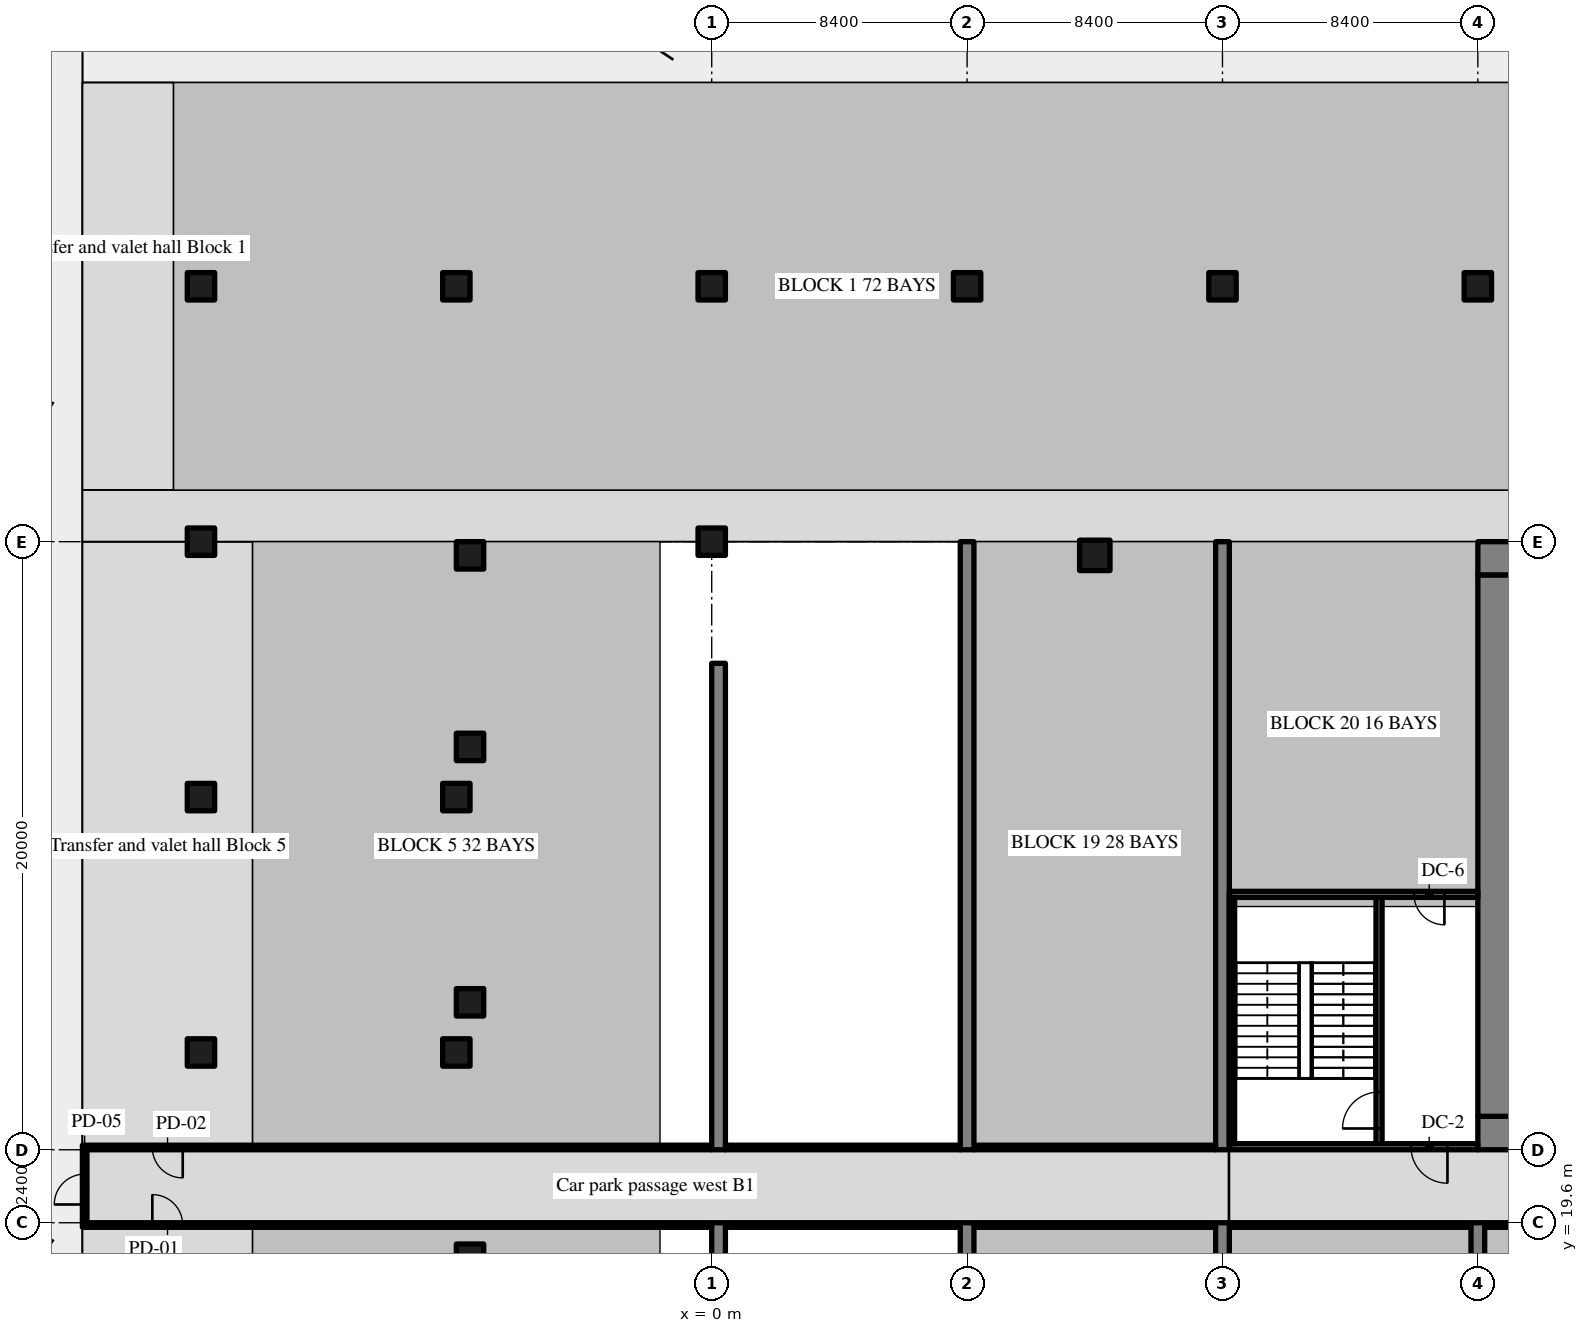
"""IFC4 building model, lengths in metres.
Left out: names, types, materials, properties, quantities, classifications, styles, units other than length and angle.
Written with IfcOpenShell. Run it as: python <this file> out.ifc"""

import sys

from ifc_helpers import new_model, si_unit, direction, frame, frame_2d, origin, origin_2d, place, context, subcontext, project, spatial, rectangle, extrude, source, transform, mapped, element, fill, save


model = new_model("IFC4")
c1 = context("Model", 3, precision=1e-05, world=origin(), true_north=direction((0.0, 1.0)))
c2 = subcontext(c1, "Body", "Model", "MODEL_VIEW")
j1 = project(units=[si_unit("LENGTHUNIT", "METRE"), si_unit("PLANEANGLEUNIT", "RADIAN")], contexts=[c1])
p1 = place(None, origin())
s1 = spatial("IfcSite", under=j1, at=p1, CompositionType="ELEMENT")
p2 = place(p1, origin())
s2 = spatial("IfcBuilding", under=s1, at=p2, CompositionType="ELEMENT")
p3 = place(p2, frame((0.0, 0.0, -4.5)))
s3 = spatial("IfcBuildingStorey", under=s2, at=p3, CompositionType="ELEMENT", Elevation=-4.5)
m1 = source(origin(), c2, "Body", "SweptSolid", [
    extrude(rectangle(XDim=50.4, YDim=1.1, at=frame_2d((25.2, 0.0))), origin(), (0.0, 0.0, 1.0), 4.22),
])
p4 = place(p3, frame((25.2, 22.55, 0.0), z_axis=(0.0, 0.0, 1.0), x_axis=(1.0, 0.0, 0.0)))
e1 = element("IfcWall", 1, at=p4, inside=s3, PredefinedType="SHEAR", context=c2, shape_type="MappedRepresentation", body=[
    mapped(m1, transform((0.0, 0.0, 0.0), scale=1.0)),
])
m2 = source(origin(), c2, "Body", "SweptSolid", [
    extrude(rectangle(XDim=1.8, YDim=2.1, at=frame_2d((0.9, 1.05))), frame((0.0, 0.56, 0.0), z_axis=(0.0, -1.0, 0.0), x_axis=(1.0, 0.0, 0.0)), (0.0, 0.0, 1.0), 1.12),
])
p5 = place(p4, frame((15.9, 0.0, 0.0)))
e2 = element("IfcOpeningElement", 2, at=p5, cuts=e1, PredefinedType="OPENING", context=c2, shape_type="MappedRepresentation", body=[
    mapped(m2, transform((0.0, 0.0, 0.0), scale=1.0)),
])
m3 = source(origin(), c2, "Body", "SweptSolid", [
    extrude(rectangle(XDim=1.2, YDim=2.1, at=frame_2d((0.6, 1.05))), frame((0.0, 0.56, 0.0), z_axis=(0.0, -1.0, 0.0), x_axis=(1.0, 0.0, 0.0)), (0.0, 0.0, 1.0), 1.12),
])
p6 = place(p4, frame((27.0, 0.0, 0.0)))
e3 = element("IfcOpeningElement", 3, at=p6, cuts=e1, PredefinedType="OPENING", context=c2, shape_type="MappedRepresentation", body=[
    mapped(m3, transform((0.0, 0.0, 0.0), scale=1.0)),
])
m4 = source(origin(), c2, "Body", "SweptSolid", [
    extrude(rectangle(XDim=0.9, YDim=2.1, at=frame_2d((0.45, 1.05))), frame((0.0, 0.56, 0.0), z_axis=(0.0, -1.0, 0.0), x_axis=(1.0, 0.0, 0.0)), (0.0, 0.0, 1.0), 1.12),
])
p7 = place(p4, frame((34.5, 0.0, 0.0)))
e4 = element("IfcOpeningElement", 4, at=p7, cuts=e1, PredefinedType="OPENING", context=c2, shape_type="MappedRepresentation", body=[
    mapped(m4, transform((0.0, 0.0, 0.0), scale=1.0)),
])
p8 = place(p4, frame((31.5, 0.0, 0.0)))
e5 = element("IfcOpeningElement", 5, at=p8, cuts=e1, PredefinedType="OPENING", context=c2, shape_type="MappedRepresentation", body=[
    mapped(m4, transform((0.0, 0.0, 0.0), scale=1.0)),
])
p9 = place(p4, frame((39.75, 0.0, 0.0)))
e6 = element("IfcOpeningElement", 6, at=p9, cuts=e1, PredefinedType="OPENING", context=c2, shape_type="MappedRepresentation", body=[
    mapped(m4, transform((0.0, 0.0, 0.0), scale=1.0)),
])
p10 = place(p4, frame((36.75, 0.0, 0.0)))
e7 = element("IfcOpeningElement", 7, at=p10, cuts=e1, PredefinedType="OPENING", context=c2, shape_type="MappedRepresentation", body=[
    mapped(m4, transform((0.0, 0.0, 0.0), scale=1.0)),
])
p11 = place(p4, frame((6.425, 0.0, 0.0)))
e8 = element("IfcOpeningElement", 8, at=p11, cuts=e1, PredefinedType="OPENING", context=c2, shape_type="MappedRepresentation", body=[
    mapped(m3, transform((0.0, 0.0, 0.0), scale=1.0)),
])
p12 = place(p4, frame((47.675, 0.0, 0.0)))
e9 = element("IfcOpeningElement", 9, at=p12, cuts=e1, PredefinedType="OPENING", context=c2, shape_type="MappedRepresentation", body=[
    mapped(m3, transform((0.0, 0.0, 0.0), scale=1.0)),
])
p13 = place(p3, frame((25.2, 41.45, 0.0), z_axis=(0.0, 0.0, 1.0), x_axis=(1.0, 0.0, 0.0)))
e10 = element("IfcWall", 10, at=p13, inside=s3, PredefinedType="SHEAR", context=c2, shape_type="MappedRepresentation", body=[
    mapped(m1, transform((0.0, 0.0, 0.0), scale=1.0)),
])
m5 = source(origin(), c2, "Body", "SweptSolid", [
    extrude(rectangle(XDim=17.8, YDim=1.1, at=frame_2d((8.9, 0.0))), origin(), (0.0, 0.0, 1.0), 4.22),
])
p14 = place(p3, frame((25.75, 23.1, 0.0), z_axis=(0.0, 0.0, 1.0), x_axis=(0.0, 1.0, 0.0)))
e11 = element("IfcWall", 11, at=p14, inside=s3, PredefinedType="SHEAR", context=c2, shape_type="MappedRepresentation", body=[
    mapped(m5, transform((0.0, 0.0, 0.0), scale=1.0)),
])
m6 = source(origin(), c2, "Body", "SweptSolid", [
    extrude(rectangle(XDim=15.6, YDim=0.45, at=frame_2d((7.8, 0.0))), origin(), (0.0, 0.0, 1.0), 4.22),
])
p15 = place(p3, frame((0.225, 4.0, 0.0), z_axis=(0.0, 0.0, 1.0), x_axis=(0.0, 1.0, 0.0)))
e12 = element("IfcWall", 12, at=p15, inside=s3, PredefinedType="SHEAR", context=c2, shape_type="MappedRepresentation", body=[
    mapped(m6, transform((0.0, 0.0, 0.0), scale=1.0)),
])
m7 = source(origin(), c2, "Body", "SweptSolid", [
    extrude(rectangle(XDim=16.0, YDim=0.45, at=frame_2d((8.0, 0.0))), origin(), (0.0, 0.0, 1.0), 4.22),
])
p16 = place(p3, frame((0.225, 22.0, 0.0), z_axis=(0.0, 0.0, 1.0), x_axis=(0.0, 1.0, 0.0)))
e13 = element("IfcWall", 13, at=p16, inside=s3, PredefinedType="SHEAR", context=c2, shape_type="MappedRepresentation", body=[
    mapped(m7, transform((0.0, 0.0, 0.0), scale=1.0)),
])
m8 = source(origin(), c2, "Body", "SweptSolid", [
    extrude(rectangle(XDim=19.6, YDim=0.45, at=frame_2d((9.8, 0.0))), origin(), (0.0, 0.0, 1.0), 4.22),
])
p17 = place(p3, frame((8.4, 0.0, 0.0), z_axis=(0.0, 0.0, 1.0), x_axis=(0.0, 1.0, 0.0)))
e14 = element("IfcWall", 14, at=p17, inside=s3, PredefinedType="SHEAR", context=c2, shape_type="MappedRepresentation", body=[
    mapped(m8, transform((0.0, 0.0, 0.0), scale=1.0)),
])
m9 = source(origin(), c2, "Body", "SweptSolid", [
    extrude(rectangle(XDim=20.0, YDim=0.45, at=frame_2d((10.0, 0.0))), origin(), (0.0, 0.0, 1.0), 4.22),
])
p18 = place(p3, frame((8.4, 22.0, 0.0), z_axis=(0.0, 0.0, 1.0), x_axis=(0.0, 1.0, 0.0)))
e15 = element("IfcWall", 15, at=p18, inside=s3, PredefinedType="SHEAR", context=c2, shape_type="MappedRepresentation", body=[
    mapped(m9, transform((0.0, 0.0, 0.0), scale=1.0)),
])
p19 = place(p3, frame((16.8, 0.0, 0.0), z_axis=(0.0, 0.0, 1.0), x_axis=(0.0, 1.0, 0.0)))
e16 = element("IfcWall", 16, at=p19, inside=s3, PredefinedType="SHEAR", context=c2, shape_type="MappedRepresentation", body=[
    mapped(m8, transform((0.0, 0.0, 0.0), scale=1.0)),
])
p20 = place(p3, frame((16.8, 22.0, 0.0), z_axis=(0.0, 0.0, 1.0), x_axis=(0.0, 1.0, 0.0)))
e17 = element("IfcWall", 17, at=p20, inside=s3, PredefinedType="SHEAR", context=c2, shape_type="MappedRepresentation", body=[
    mapped(m9, transform((0.0, 0.0, 0.0), scale=1.0)),
])
p21 = place(p3, frame((25.2, 0.0, 0.0), z_axis=(0.0, 0.0, 1.0), x_axis=(0.0, 1.0, 0.0)))
e18 = element("IfcWall", 18, at=p21, inside=s3, PredefinedType="SHEAR", context=c2, shape_type="MappedRepresentation", body=[
    mapped(m8, transform((0.0, 0.0, 0.0), scale=1.0)),
])
m10 = source(origin(), c2, "Body", "SweptSolid", [
    extrude(rectangle(XDim=1.0, YDim=1.0, at=origin_2d()), origin(), (0.0, 0.0, 1.0), 4.22),
])
p22 = place(p3, frame((12.6, 41.55, 0.0), z_axis=(0.0, 0.0, 1.0), x_axis=(1.0, 0.0, 0.0)))
e19 = element("IfcColumn", 19, at=p22, inside=s3, PredefinedType="COLUMN", context=c2, shape_type="MappedRepresentation", body=[
    mapped(m10, transform((0.0, 0.0, 0.0), scale=1.0)),
])
m11 = source(origin(), c2, "Body", "SweptSolid", [
    extrude(rectangle(XDim=0.9, YDim=0.9, at=origin_2d()), origin(), (0.0, 0.0, 1.0), 4.22),
])
for number, where, z_axis, x_axis in (
    (20, (-7.95, 18.45, 0.0), (0.0, 0.0, 1.0), (1.0, 0.0, 0.0)),
    (21, (-7.95, 26.85, 0.0), (0.0, 0.0, 1.0), (1.0, 0.0, 0.0)),
    (22, (-7.95, 35.25, 0.0), (0.0, 0.0, 1.0), (1.0, 0.0, 0.0)),
    (23, (-7.95, 41.55, 0.0), (0.0, 0.0, 1.0), (1.0, 0.0, 0.0)),
    (24, (-16.8, 25.2, 0.0), (0.0, 0.0, 1.0), (1.0, 0.0, 0.0)),
    (25, (-16.8, 33.6, 0.0), (0.0, 0.0, 1.0), (1.0, 0.0, 0.0)),
    (26, (-16.8, 42.0, 0.0), (0.0, 0.0, 1.0), (1.0, 0.0, 0.0)),
    (27, (-16.8, 50.4, 0.0), (0.0, 0.0, 1.0), (1.0, 0.0, 0.0)),
    (28, (-8.4, 25.2, 0.0), (0.0, 0.0, 1.0), (1.0, 0.0, 0.0)),
    (29, (-8.4, 33.6, 0.0), (0.0, 0.0, 1.0), (1.0, 0.0, 0.0)),
    (30, (-8.4, 50.4, 0.0), (0.0, 0.0, 1.0), (1.0, 0.0, 0.0)),
    (31, (0.0, 42.0, 0.0), (0.0, 0.0, 1.0), (1.0, 0.0, 0.0)),
    (32, (0.0, 50.4, 0.0), (0.0, 0.0, 1.0), (1.0, 0.0, 0.0)),
    (33, (8.4, 50.4, 0.0), (0.0, 0.0, 1.0), (1.0, 0.0, 0.0)),
    (34, (16.8, 50.4, 0.0), (0.0, 0.0, 1.0), (1.0, 0.0, 0.0)),
    (35, (25.2, 50.4, 0.0), (0.0, 0.0, 1.0), (1.0, 0.0, 0.0)),
):
    element("IfcColumn", number, at=place(p3, frame(where, z_axis=z_axis, x_axis=x_axis)), inside=s3, PredefinedType="COLUMN", context=c2, shape_type="MappedRepresentation", body=[
        mapped(m11, transform((0.0, 0.0, 0.0), scale=1.0)),
    ])
m12 = source(origin(), c2, "Body", "SweptSolid", [
    extrude(rectangle(XDim=8.3, YDim=0.2, at=frame_2d((4.15, 0.0))), origin(), (0.0, 0.0, 1.0), 4.22),
])
p23 = place(p3, frame((21.95, 22.1, 0.0), z_axis=(0.0, 0.0, 1.0), x_axis=(0.0, 1.0, 0.0)))
e36 = element("IfcWall", 36, at=p23, inside=s3, PredefinedType="SOLIDWALL", context=c2, shape_type="MappedRepresentation", body=[
    mapped(m12, transform((0.0, 0.0, 0.0), scale=1.0)),
])
m13 = source(origin(), c2, "Body", "SweptSolid", [
    extrude(rectangle(XDim=1.2, YDim=2.1, at=frame_2d((0.6, 1.05))), frame((0.0, 0.11, 0.0), z_axis=(0.0, -1.0, 0.0), x_axis=(1.0, 0.0, 0.0)), (0.0, 0.0, 1.0), 0.22),
])
p24 = place(p23, frame((0.6, 0.0, 0.0)))
e37 = element("IfcOpeningElement", 37, at=p24, cuts=e36, PredefinedType="OPENING", context=c2, shape_type="MappedRepresentation", body=[
    mapped(m13, transform((0.0, 0.0, 0.0), scale=1.0)),
])
m14 = source(origin(), c2, "Body", "SweptSolid", [
    extrude(rectangle(XDim=8.175, YDim=0.2, at=frame_2d((4.087, 0.0))), origin(), (0.0, 0.0, 1.0), 4.22),
])
p25 = place(p3, frame((17.025, 22.1, 0.0), z_axis=(0.0, 0.0, 1.0), x_axis=(1.0, 0.0, 0.0)))
e38 = element("IfcWall", 38, at=p25, inside=s3, PredefinedType="SOLIDWALL", context=c2, shape_type="MappedRepresentation", body=[
    mapped(m14, transform((0.0, 0.0, 0.0), scale=1.0)),
])
p26 = place(p25, frame((5.975, 0.0, 0.0)))
e39 = element("IfcOpeningElement", 39, at=p26, cuts=e38, PredefinedType="OPENING", context=c2, shape_type="MappedRepresentation", body=[
    mapped(m13, transform((0.0, 0.0, 0.0), scale=1.0)),
])
p27 = place(p3, frame((17.025, 30.4, 0.0), z_axis=(0.0, 0.0, 1.0), x_axis=(1.0, 0.0, 0.0)))
e40 = element("IfcWall", 40, at=p27, inside=s3, PredefinedType="SOLIDWALL", context=c2, shape_type="MappedRepresentation", body=[
    mapped(m14, transform((0.0, 0.0, 0.0), scale=1.0)),
])
m15 = source(origin(), c2, "Body", "SweptSolid", [
    extrude(rectangle(XDim=1.0, YDim=2.1, at=frame_2d((0.5, 1.05))), frame((0.0, 0.11, 0.0), z_axis=(0.0, -1.0, 0.0), x_axis=(1.0, 0.0, 0.0)), (0.0, 0.0, 1.0), 0.22),
])
p28 = place(p27, frame((6.075, 0.0, 0.0)))
e41 = element("IfcOpeningElement", 41, at=p28, cuts=e40, PredefinedType="OPENING", context=c2, shape_type="MappedRepresentation", body=[
    mapped(m15, transform((0.0, 0.0, 0.0), scale=1.0)),
])
m16 = source(origin(), c2, "Body", "SweptSolid", [
    extrude(rectangle(XDim=8.1, YDim=0.175, at=frame_2d((4.05, 0.0))), origin(), (0.0, 0.0, 1.0), 4.22),
])
p29 = place(p3, frame((17.112, 22.2, 0.0), z_axis=(0.0, 0.0, 1.0), x_axis=(0.0, 1.0, 0.0)))
e42 = element("IfcWall", 42, at=p29, inside=s3, PredefinedType="SOLIDWALL", context=c2, shape_type="MappedRepresentation", body=[
    mapped(m16, transform((0.0, 0.0, 0.0), scale=1.0)),
])
m17 = source(origin(), c2, "Body", "SweptSolid", [
    extrude(rectangle(XDim=20.7, YDim=0.15, at=frame_2d((10.35, 0.0))), origin(), (0.0, 0.0, 1.0), 4.22),
])
p30 = place(p3, frame((-20.7, 19.525, 0.0), z_axis=(0.0, 0.0, 1.0), x_axis=(1.0, 0.0, 0.0)))
e43 = element("IfcWall", 43, at=p30, inside=s3, PredefinedType="PARTITIONING", context=c2, shape_type="MappedRepresentation", body=[
    mapped(m17, transform((0.0, 0.0, 0.0), scale=1.0)),
])
m18 = source(origin(), c2, "Body", "SweptSolid", [
    extrude(rectangle(XDim=1.0, YDim=2.1, at=frame_2d((0.5, 1.05))), frame((0.0, 0.085, 0.0), z_axis=(0.0, -1.0, 0.0), x_axis=(1.0, 0.0, 0.0)), (0.0, 0.0, 1.0), 0.17),
])
p31 = place(p30, frame((2.3, 0.0, 0.0)))
e44 = element("IfcOpeningElement", 44, at=p31, cuts=e43, PredefinedType="OPENING", context=c2, shape_type="MappedRepresentation", body=[
    mapped(m18, transform((0.0, 0.0, 0.0), scale=1.0)),
])
p32 = place(p3, frame((-20.7, 22.075, 0.0), z_axis=(0.0, 0.0, 1.0), x_axis=(1.0, 0.0, 0.0)))
e45 = element("IfcWall", 45, at=p32, inside=s3, PredefinedType="PARTITIONING", context=c2, shape_type="MappedRepresentation", body=[
    mapped(m17, transform((0.0, 0.0, 0.0), scale=1.0)),
])
p33 = place(p32, frame((2.3, 0.0, 0.0)))
e46 = element("IfcOpeningElement", 46, at=p33, cuts=e45, PredefinedType="OPENING", context=c2, shape_type="MappedRepresentation", body=[
    mapped(m18, transform((0.0, 0.0, 0.0), scale=1.0)),
])
m19 = source(origin(), c2, "Body", "SweptSolid", [
    extrude(rectangle(XDim=7.725, YDim=0.15, at=frame_2d((3.863, 0.0))), origin(), (0.0, 0.0, 1.0), 4.22),
])
for number, where, z_axis, x_axis in (
    (47, (0.45, 19.525, 0.0), (0.0, 0.0, 1.0), (1.0, 0.0, 0.0)),
    (48, (0.45, 22.075, 0.0), (0.0, 0.0, 1.0), (1.0, 0.0, 0.0)),
):
    element("IfcWall", number, at=place(p3, frame(where, z_axis=z_axis, x_axis=x_axis)), inside=s3, PredefinedType="PARTITIONING", context=c2, shape_type="MappedRepresentation", body=[
        mapped(m19, transform((0.0, 0.0, 0.0), scale=1.0)),
    ])
m20 = source(origin(), c2, "Body", "SweptSolid", [
    extrude(rectangle(XDim=7.95, YDim=0.15, at=frame_2d((3.975, 0.0))), origin(), (0.0, 0.0, 1.0), 4.22),
])
for number, where, z_axis, x_axis in (
    (49, (8.625, 19.525, 0.0), (0.0, 0.0, 1.0), (1.0, 0.0, 0.0)),
    (50, (8.625, 22.075, 0.0), (0.0, 0.0, 1.0), (1.0, 0.0, 0.0)),
):
    element("IfcWall", number, at=place(p3, frame(where, z_axis=z_axis, x_axis=x_axis)), inside=s3, PredefinedType="PARTITIONING", context=c2, shape_type="MappedRepresentation", body=[
        mapped(m20, transform((0.0, 0.0, 0.0), scale=1.0)),
    ])
m21 = source(origin(), c2, "Body", "SweptSolid", [
    extrude(rectangle(XDim=7.95, YDim=0.15, at=frame_2d((3.975, 0.0))), origin(), (0.0, 0.0, 1.0), 4.22),
])
p34 = place(p3, frame((17.025, 19.525, 0.0), z_axis=(0.0, 0.0, 1.0), x_axis=(1.0, 0.0, 0.0)))
e51 = element("IfcWall", 51, at=p34, inside=s3, PredefinedType="PARTITIONING", context=c2, shape_type="MappedRepresentation", body=[
    mapped(m21, transform((0.0, 0.0, 0.0), scale=1.0)),
])
p35 = place(p3, frame((25.425, 19.525, 0.0), z_axis=(0.0, 0.0, 1.0), x_axis=(1.0, 0.0, 0.0)))
e52 = element("IfcWall", 52, at=p35, inside=s3, PredefinedType="PARTITIONING", context=c2, shape_type="MappedRepresentation", body=[
    mapped(m20, transform((0.0, 0.0, 0.0), scale=1.0)),
])
m22 = source(origin(), c2, "Body", "SweptSolid", [
    extrude(rectangle(XDim=2.4, YDim=0.15, at=frame_2d((1.2, 0.0))), origin(), (0.0, 0.0, 1.0), 4.22),
])
p36 = place(p3, frame((-20.625, 19.6, 0.0), z_axis=(0.0, 0.0, 1.0), x_axis=(0.0, 1.0, 0.0)))
e53 = element("IfcWall", 53, at=p36, inside=s3, PredefinedType="PARTITIONING", context=c2, shape_type="MappedRepresentation", body=[
    mapped(m22, transform((0.0, 0.0, 0.0), scale=1.0)),
])
p37 = place(p36, frame((0.6, 0.0, 0.0)))
e54 = element("IfcOpeningElement", 54, at=p37, cuts=e53, PredefinedType="OPENING", context=c2, shape_type="MappedRepresentation", body=[
    mapped(m18, transform((0.0, 0.0, 0.0), scale=1.0)),
])
m23 = source(origin(), c2, "Body", "SweptSolid", [
    extrude(rectangle(XDim=1.2, YDim=2.1, at=frame_2d((0.6, 1.05))), frame((0.0, 0.025, 0.0), z_axis=(0.0, -1.0, 0.0), x_axis=(1.0, 0.0, 0.0)), (0.0, 0.0, 1.0), 0.05),
])
p38 = place(p24, origin())
e55 = element("IfcDoor", 55, at=p38, inside=s3, OperationType="SINGLE_SWING_LEFT", PredefinedType="DOOR", context=c2, shape_type="MappedRepresentation", body=[
    mapped(m23, transform((0.0, 0.0, 0.0), scale=1.0)),
])
fill(e37, e55)
p39 = place(p26, origin())
e56 = element("IfcDoor", 56, at=p39, inside=s3, OperationType="SINGLE_SWING_RIGHT", PredefinedType="DOOR", context=c2, shape_type="MappedRepresentation", body=[
    mapped(m23, transform((0.0, 0.0, 0.0), scale=1.0)),
])
fill(e39, e56)
m24 = source(origin(), c2, "Body", "SweptSolid", [
    extrude(rectangle(XDim=1.0, YDim=2.1, at=frame_2d((0.5, 1.05))), frame((0.0, 0.025, 0.0), z_axis=(0.0, -1.0, 0.0), x_axis=(1.0, 0.0, 0.0)), (0.0, 0.0, 1.0), 0.05),
])
p40 = place(p28, origin())
e57 = element("IfcDoor", 57, at=p40, inside=s3, OperationType="SINGLE_SWING_RIGHT", PredefinedType="DOOR", context=c2, shape_type="MappedRepresentation", body=[
    mapped(m24, transform((0.0, 0.0, 0.0), scale=1.0)),
])
fill(e41, e57)
p41 = place(p31, origin())
e58 = element("IfcDoor", 58, at=p41, inside=s3, OperationType="SINGLE_SWING_LEFT", PredefinedType="DOOR", context=c2, shape_type="MappedRepresentation", body=[
    mapped(m24, transform((0.0, 0.0, 0.0), scale=1.0)),
])
fill(e44, e58)
p42 = place(p33, origin())
e59 = element("IfcDoor", 59, at=p42, inside=s3, OperationType="SINGLE_SWING_RIGHT", PredefinedType="DOOR", context=c2, shape_type="MappedRepresentation", body=[
    mapped(m24, transform((0.0, 0.0, 0.0), scale=1.0)),
])
fill(e46, e59)
p43 = place(p37, origin())
e60 = element("IfcDoor", 60, at=p43, inside=s3, OperationType="SINGLE_SWING_LEFT", PredefinedType="DOOR", context=c2, shape_type="MappedRepresentation", body=[
    mapped(m24, transform((0.0, 0.0, 0.0), scale=1.0)),
])
fill(e54, e60)
save(model, sys.argv[1])
